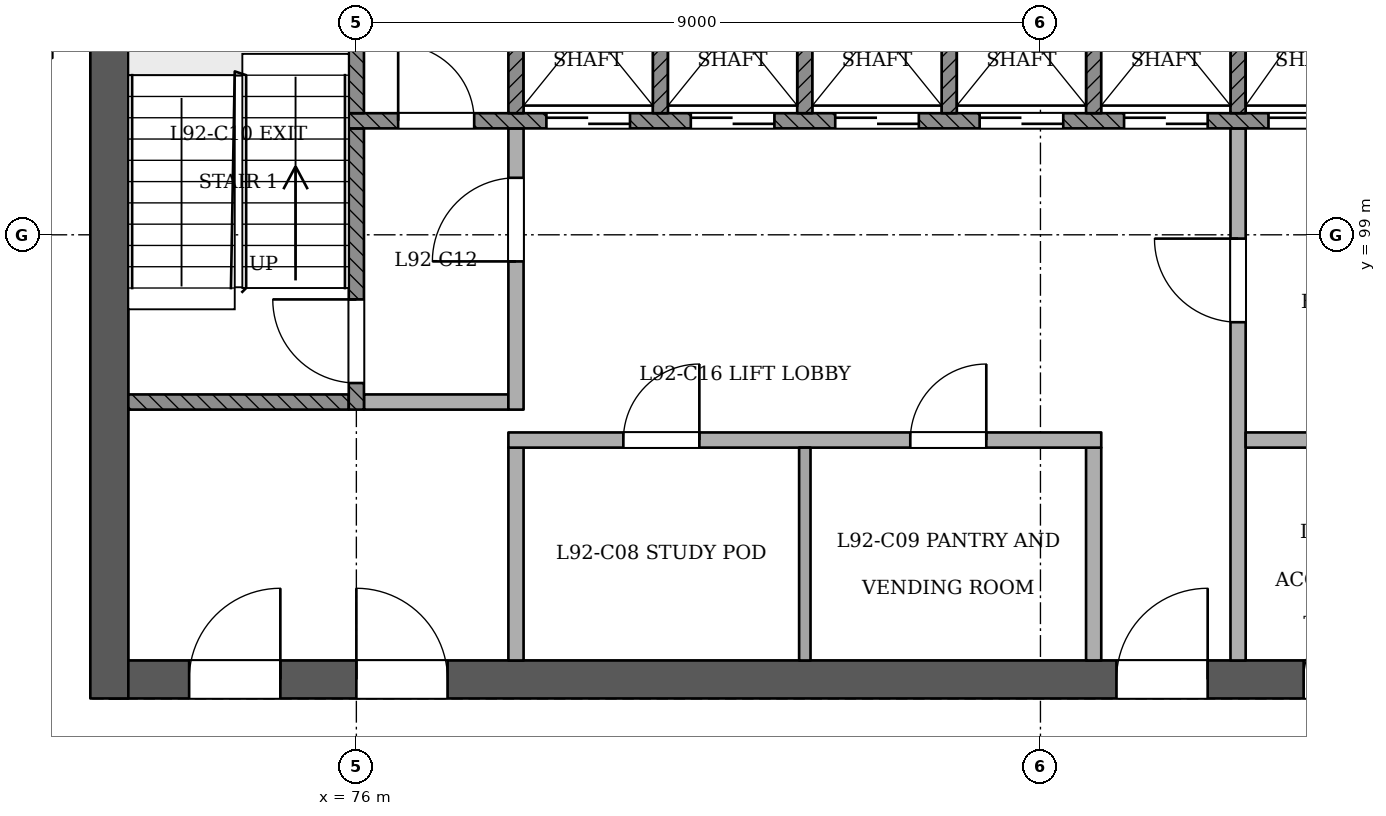
"""IFC4 building model, lengths in metres.
Left out: names, types, materials, properties, quantities, classifications, styles, units other than length and angle.
Written with IfcOpenShell. Run it as: python <this file> out.ifc"""

import sys

from ifc_helpers import new_model, si_unit, direction, frame, frame_2d, origin, place, context, subcontext, project, spatial, rectangle, extrude, element, fill, save


model = new_model("IFC4")
c1 = context("Model", 3, precision=1e-05, world=origin(), true_north=direction((0.0, 1.0)))
c2 = subcontext(c1, "Body", "Model", "MODEL_VIEW")
j1 = project(units=[si_unit("LENGTHUNIT", "METRE"), si_unit("PLANEANGLEUNIT", "RADIAN")], contexts=[c1])
p1 = place(None, origin())
s1 = spatial("IfcSite", under=j1, at=p1, CompositionType="ELEMENT")
p2 = place(p1, origin())
s2 = spatial("IfcBuilding", under=s1, at=p2, CompositionType="ELEMENT")
p3 = place(p2, frame((0.0, 0.0, 354.4)))
s3 = spatial("IfcBuildingStorey", under=s2, at=p3, CompositionType="ELEMENT", Elevation=354.4)
p4 = place(p3, frame((72.75, 93.15, 0.0), z_axis=(0.0, 0.0, 1.0), x_axis=(1.0, 0.0, 0.0)))
e1 = element("IfcWall", 1, at=p4, inside=s3, PredefinedType="SHEAR", context=c2, shape_type="SweptSolid", body=[
    extrude(rectangle(XDim=24.75, YDim=0.5, at=frame_2d((12.375, 0.0))), origin(), (0.0, 0.0, 1.0), 3.6),
])
p5 = place(p4, frame((1.05, 0.0, 0.0)))
e2 = element("IfcOpeningElement", 2, at=p5, cuts=e1, PredefinedType="OPENING", context=c2, shape_type="SweptSolid", body=[
    extrude(rectangle(XDim=1.2, YDim=2.1, at=frame_2d((0.6, 1.05))), frame((0.0, 0.26, 0.0), z_axis=(0.0, -1.0, 0.0), x_axis=(1.0, 0.0, 0.0)), (0.0, 0.0, 1.0), 0.521),
])
p6 = place(p4, frame((3.25, 0.0, 0.0)))
e3 = element("IfcOpeningElement", 3, at=p6, cuts=e1, PredefinedType="OPENING", context=c2, shape_type="SweptSolid", body=[
    extrude(rectangle(XDim=1.2, YDim=2.1, at=frame_2d((0.6, 1.05))), frame((0.0, 0.26, 0.0), z_axis=(0.0, -1.0, 0.0), x_axis=(1.0, 0.0, 0.0)), (0.0, 0.0, 1.0), 0.521),
])
p7 = place(p4, frame((13.25, 0.0, 0.0)))
e4 = element("IfcOpeningElement", 4, at=p7, cuts=e1, PredefinedType="OPENING", context=c2, shape_type="SweptSolid", body=[
    extrude(rectangle(XDim=1.2, YDim=2.1, at=frame_2d((0.6, 1.05))), frame((0.0, 0.26, 0.0), z_axis=(0.0, -1.0, 0.0), x_axis=(1.0, 0.0, 0.0)), (0.0, 0.0, 1.0), 0.521),
])
p8 = place(p4, frame((15.712, 0.0, 0.0)))
e5 = element("IfcOpeningElement", 5, at=p8, cuts=e1, PredefinedType="OPENING", context=c2, shape_type="SweptSolid", body=[
    extrude(rectangle(XDim=1.0, YDim=2.1, at=frame_2d((0.5, 1.05))), frame((0.0, 0.26, 0.0), z_axis=(0.0, -1.0, 0.0), x_axis=(1.0, 0.0, 0.0)), (0.0, 0.0, 1.0), 0.521),
])
p9 = place(p4, frame((18.15, 0.0, 0.0)))
e6 = element("IfcOpeningElement", 6, at=p9, cuts=e1, PredefinedType="OPENING", context=c2, shape_type="SweptSolid", body=[
    extrude(rectangle(XDim=1.0, YDim=2.1, at=frame_2d((0.5, 1.05))), frame((0.0, 0.26, 0.0), z_axis=(0.0, -1.0, 0.0), x_axis=(1.0, 0.0, 0.0)), (0.0, 0.0, 1.0), 0.521),
])
p10 = place(p4, frame((20.5, 0.0, 0.0)))
e7 = element("IfcOpeningElement", 7, at=p10, cuts=e1, PredefinedType="OPENING", context=c2, shape_type="SweptSolid", body=[
    extrude(rectangle(XDim=1.0, YDim=2.1, at=frame_2d((0.5, 1.05))), frame((0.0, 0.26, 0.0), z_axis=(0.0, -1.0, 0.0), x_axis=(1.0, 0.0, 0.0)), (0.0, 0.0, 1.0), 0.521),
])
p11 = place(p4, frame((22.788, 0.0, 0.0)))
e8 = element("IfcOpeningElement", 8, at=p11, cuts=e1, PredefinedType="OPENING", context=c2, shape_type="SweptSolid", body=[
    extrude(rectangle(XDim=1.0, YDim=2.1, at=frame_2d((0.5, 1.05))), frame((0.0, 0.26, 0.0), z_axis=(0.0, -1.0, 0.0), x_axis=(1.0, 0.0, 0.0)), (0.0, 0.0, 1.0), 0.521),
])
p12 = place(p3, frame((72.75, 103.65, 0.0), z_axis=(0.0, 0.0, 1.0), x_axis=(0.0, -1.0, 0.0)))
e9 = element("IfcWall", 9, at=p12, inside=s3, PredefinedType="SHEAR", context=c2, shape_type="SweptSolid", body=[
    extrude(rectangle(XDim=10.75, YDim=0.5, at=frame_2d((5.375, 0.0))), origin(), (0.0, 0.0, 1.0), 3.6),
])
p13 = place(p3, frame((78.1, 93.4, 0.0), z_axis=(0.0, 0.0, 1.0), x_axis=(0.0, 1.0, 0.0)))
e10 = element("IfcWall", 10, at=p13, inside=s3, PredefinedType="PARTITIONING", context=c2, shape_type="SweptSolid", body=[
    extrude(rectangle(XDim=2.8, YDim=0.2, at=frame_2d((1.4, 0.0))), origin(), (0.0, 0.0, 1.0), 3.3),
])
p14 = place(p3, frame((81.9, 93.4, 0.0), z_axis=(0.0, 0.0, 1.0), x_axis=(0.0, 1.0, 0.0)))
e11 = element("IfcWall", 11, at=p14, inside=s3, PredefinedType="PARTITIONING", context=c2, shape_type="SweptSolid", body=[
    extrude(rectangle(XDim=2.8, YDim=0.15, at=frame_2d((1.4, 0.0))), origin(), (0.0, 0.0, 1.0), 3.3),
])
p15 = place(p3, frame((85.7, 93.4, 0.0), z_axis=(0.0, 0.0, 1.0), x_axis=(0.0, 1.0, 0.0)))
e12 = element("IfcWall", 12, at=p15, inside=s3, PredefinedType="PARTITIONING", context=c2, shape_type="SweptSolid", body=[
    extrude(rectangle(XDim=2.8, YDim=0.2, at=frame_2d((1.4, 0.0))), origin(), (0.0, 0.0, 1.0), 3.3),
])
p16 = place(p3, frame((87.6, 93.4, 0.0), z_axis=(0.0, 0.0, 1.0), x_axis=(0.0, 1.0, 0.0)))
e13 = element("IfcWall", 13, at=p16, inside=s3, PredefinedType="PARTITIONING", context=c2, shape_type="SweptSolid", body=[
    extrude(rectangle(XDim=7.0, YDim=0.2, at=frame_2d((3.5, 0.0))), origin(), (0.0, 0.0, 1.0), 3.3),
])
p17 = place(p16, frame((4.45, 0.0, 0.0)))
e14 = element("IfcOpeningElement", 14, at=p17, cuts=e13, PredefinedType="OPENING", context=c2, shape_type="SweptSolid", body=[
    extrude(rectangle(XDim=1.1, YDim=2.1, at=frame_2d((0.55, 1.05))), frame((0.0, 0.11, 0.0), z_axis=(0.0, -1.0, 0.0), x_axis=(1.0, 0.0, 0.0)), (0.0, 0.0, 1.0), 0.221),
])
p18 = place(p3, frame((78.0, 96.3, 0.0), z_axis=(0.0, 0.0, 1.0), x_axis=(1.0, 0.0, 0.0)))
e15 = element("IfcWall", 15, at=p18, inside=s3, PredefinedType="PARTITIONING", context=c2, shape_type="SweptSolid", body=[
    extrude(rectangle(XDim=7.8, YDim=0.2, at=frame_2d((3.9, 0.0))), origin(), (0.0, 0.0, 1.0), 3.3),
])
p19 = place(p18, frame((1.512, 0.0, 0.0)))
e16 = element("IfcOpeningElement", 16, at=p19, cuts=e15, PredefinedType="OPENING", context=c2, shape_type="SweptSolid", body=[
    extrude(rectangle(XDim=1.0, YDim=2.1, at=frame_2d((0.5, 1.05))), frame((0.0, 0.11, 0.0), z_axis=(0.0, -1.0, 0.0), x_axis=(1.0, 0.0, 0.0)), (0.0, 0.0, 1.0), 0.221),
])
p20 = place(p18, frame((5.288, 0.0, 0.0)))
e17 = element("IfcOpeningElement", 17, at=p20, cuts=e15, PredefinedType="OPENING", context=c2, shape_type="SweptSolid", body=[
    extrude(rectangle(XDim=1.0, YDim=2.1, at=frame_2d((0.5, 1.05))), frame((0.0, 0.11, 0.0), z_axis=(0.0, -1.0, 0.0), x_axis=(1.0, 0.0, 0.0)), (0.0, 0.0, 1.0), 0.221),
])
p21 = place(p3, frame((87.7, 96.3, 0.0), z_axis=(0.0, 0.0, 1.0), x_axis=(1.0, 0.0, 0.0)))
e18 = element("IfcWall", 18, at=p21, inside=s3, PredefinedType="PARTITIONING", context=c2, shape_type="SweptSolid", body=[
    extrude(rectangle(XDim=3.6, YDim=0.2, at=frame_2d((1.8, 0.0))), origin(), (0.0, 0.0, 1.0), 3.3),
])
p22 = place(p3, frame((73.0, 96.8, 0.0), z_axis=(0.0, 0.0, 1.0), x_axis=(1.0, 0.0, 0.0)))
e19 = element("IfcWall", 19, at=p22, inside=s3, PredefinedType="SOLIDWALL", context=c2, shape_type="SweptSolid", body=[
    extrude(rectangle(XDim=2.9, YDim=0.2, at=frame_2d((1.45, 0.0))), origin(), (0.0, 0.0, 1.0), 3.3),
])
p23 = place(p3, frame((76.0, 96.7, 0.0), z_axis=(0.0, 0.0, 1.0), x_axis=(0.0, 1.0, 0.0)))
e20 = element("IfcWall", 20, at=p23, inside=s3, PredefinedType="SOLIDWALL", context=c2, shape_type="SweptSolid", body=[
    extrude(rectangle(XDim=3.7, YDim=0.2, at=frame_2d((1.85, 0.0))), origin(), (0.0, 0.0, 1.0), 3.3),
])
p24 = place(p23, frame((0.35, 0.0, 0.0)))
e21 = element("IfcOpeningElement", 21, at=p24, cuts=e20, PredefinedType="OPENING", context=c2, shape_type="SweptSolid", body=[
    extrude(rectangle(XDim=1.1, YDim=2.1, at=frame_2d((0.55, 1.05))), frame((0.0, 0.11, 0.0), z_axis=(0.0, -1.0, 0.0), x_axis=(1.0, 0.0, 0.0)), (0.0, 0.0, 1.0), 0.221),
])
p25 = place(p3, frame((76.1, 96.8, 0.0), z_axis=(0.0, 0.0, 1.0), x_axis=(1.0, 0.0, 0.0)))
e22 = element("IfcWall", 22, at=p25, inside=s3, PredefinedType="PARTITIONING", context=c2, shape_type="SweptSolid", body=[
    extrude(rectangle(XDim=1.9, YDim=0.2, at=frame_2d((0.95, 0.0))), origin(), (0.0, 0.0, 1.0), 3.3),
])
p26 = place(p3, frame((78.1, 96.7, 0.0), z_axis=(0.0, 0.0, 1.0), x_axis=(0.0, 1.0, 0.0)))
e23 = element("IfcWall", 23, at=p26, inside=s3, PredefinedType="PARTITIONING", context=c2, shape_type="SweptSolid", body=[
    extrude(rectangle(XDim=3.7, YDim=0.2, at=frame_2d((1.85, 0.0))), origin(), (0.0, 0.0, 1.0), 3.3),
])
p27 = place(p26, frame((1.95, 0.0, 0.0)))
e24 = element("IfcOpeningElement", 24, at=p27, cuts=e23, PredefinedType="OPENING", context=c2, shape_type="SweptSolid", body=[
    extrude(rectangle(XDim=1.1, YDim=2.1, at=frame_2d((0.55, 1.05))), frame((0.0, 0.11, 0.0), z_axis=(0.0, -1.0, 0.0), x_axis=(1.0, 0.0, 0.0)), (0.0, 0.0, 1.0), 0.221),
])
p28 = place(p3, frame((75.9, 100.5, 0.0), z_axis=(0.0, 0.0, 1.0), x_axis=(1.0, 0.0, 0.0)))
e25 = element("IfcWall", 25, at=p28, inside=s3, PredefinedType="SOLIDWALL", context=c2, shape_type="SweptSolid", body=[
    extrude(rectangle(XDim=18.2, YDim=0.2, at=frame_2d((9.1, 0.0))), origin(), (0.0, 0.0, 1.0), 3.3),
])
p29 = place(p28, frame((2.6, 0.0, 0.0)))
e26 = element("IfcOpeningElement", 26, at=p29, cuts=e25, PredefinedType="OPENING", context=c2, shape_type="SweptSolid", body=[
    extrude(rectangle(XDim=1.1, YDim=2.1, at=frame_2d((0.55, 1.05))), frame((0.0, 0.11, 0.0), z_axis=(0.0, -1.0, 0.0), x_axis=(1.0, 0.0, 0.0)), (0.0, 0.0, 1.0), 0.221),
])
p30 = place(p28, frame((4.5, 0.0, 0.0)))
e27 = element("IfcOpeningElement", 27, at=p30, cuts=e25, PredefinedType="OPENING", context=c2, shape_type="SweptSolid", body=[
    extrude(rectangle(XDim=1.1, YDim=2.1, at=frame_2d((0.55, 1.05))), frame((0.0, 0.11, 0.0), z_axis=(0.0, -1.0, 0.0), x_axis=(1.0, 0.0, 0.0)), (0.0, 0.0, 1.0), 0.221),
])
p31 = place(p28, frame((6.4, 0.0, 0.0)))
e28 = element("IfcOpeningElement", 28, at=p31, cuts=e25, PredefinedType="OPENING", context=c2, shape_type="SweptSolid", body=[
    extrude(rectangle(XDim=1.1, YDim=2.1, at=frame_2d((0.55, 1.05))), frame((0.0, 0.11, 0.0), z_axis=(0.0, -1.0, 0.0), x_axis=(1.0, 0.0, 0.0)), (0.0, 0.0, 1.0), 0.221),
])
p32 = place(p28, frame((8.3, 0.0, 0.0)))
e29 = element("IfcOpeningElement", 29, at=p32, cuts=e25, PredefinedType="OPENING", context=c2, shape_type="SweptSolid", body=[
    extrude(rectangle(XDim=1.1, YDim=2.1, at=frame_2d((0.55, 1.05))), frame((0.0, 0.11, 0.0), z_axis=(0.0, -1.0, 0.0), x_axis=(1.0, 0.0, 0.0)), (0.0, 0.0, 1.0), 0.221),
])
p33 = place(p28, frame((10.2, 0.0, 0.0)))
e30 = element("IfcOpeningElement", 30, at=p33, cuts=e25, PredefinedType="OPENING", context=c2, shape_type="SweptSolid", body=[
    extrude(rectangle(XDim=1.1, YDim=2.1, at=frame_2d((0.55, 1.05))), frame((0.0, 0.11, 0.0), z_axis=(0.0, -1.0, 0.0), x_axis=(1.0, 0.0, 0.0)), (0.0, 0.0, 1.0), 0.221),
])
p34 = place(p28, frame((12.1, 0.0, 0.0)))
e31 = element("IfcOpeningElement", 31, at=p34, cuts=e25, PredefinedType="OPENING", context=c2, shape_type="SweptSolid", body=[
    extrude(rectangle(XDim=1.1, YDim=2.1, at=frame_2d((0.55, 1.05))), frame((0.0, 0.11, 0.0), z_axis=(0.0, -1.0, 0.0), x_axis=(1.0, 0.0, 0.0)), (0.0, 0.0, 1.0), 0.221),
])
p35 = place(p28, frame((14.0, 0.0, 0.0)))
e32 = element("IfcOpeningElement", 32, at=p35, cuts=e25, PredefinedType="OPENING", context=c2, shape_type="SweptSolid", body=[
    extrude(rectangle(XDim=1.1, YDim=2.1, at=frame_2d((0.55, 1.05))), frame((0.0, 0.11, 0.0), z_axis=(0.0, -1.0, 0.0), x_axis=(1.0, 0.0, 0.0)), (0.0, 0.0, 1.0), 0.221),
])
p36 = place(p28, frame((0.65, 0.0, 0.0)))
e33 = element("IfcOpeningElement", 33, at=p36, cuts=e25, PredefinedType="OPENING", context=c2, shape_type="SweptSolid", body=[
    extrude(rectangle(XDim=1.0, YDim=2.1, at=frame_2d((0.5, 1.05))), frame((0.0, 0.11, 0.0), z_axis=(0.0, -1.0, 0.0), x_axis=(1.0, 0.0, 0.0)), (0.0, 0.0, 1.0), 0.221),
])
p37 = place(p28, frame((16.3, 0.0, 0.0)))
e34 = element("IfcOpeningElement", 34, at=p37, cuts=e25, PredefinedType="OPENING", context=c2, shape_type="SweptSolid", body=[
    extrude(rectangle(XDim=1.0, YDim=2.1, at=frame_2d((0.5, 1.05))), frame((0.0, 0.11, 0.0), z_axis=(0.0, -1.0, 0.0), x_axis=(1.0, 0.0, 0.0)), (0.0, 0.0, 1.0), 0.221),
])
for number, where, z_axis, x_axis in (
    (35, (76.0, 100.6, 0.0), (0.0, 0.0, 1.0), (0.0, 1.0, 0.0)),
    (36, (78.1, 100.6, 0.0), (0.0, 0.0, 1.0), (0.0, 1.0, 0.0)),
    (37, (80.0, 100.6, 0.0), (0.0, 0.0, 1.0), (0.0, 1.0, 0.0)),
    (38, (81.9, 100.6, 0.0), (0.0, 0.0, 1.0), (0.0, 1.0, 0.0)),
    (39, (83.8, 100.6, 0.0), (0.0, 0.0, 1.0), (0.0, 1.0, 0.0)),
    (40, (85.7, 100.6, 0.0), (0.0, 0.0, 1.0), (0.0, 1.0, 0.0)),
    (41, (87.6, 100.6, 0.0), (0.0, 0.0, 1.0), (0.0, 1.0, 0.0)),
):
    element("IfcWall", number, at=place(p3, frame(where, z_axis=z_axis, x_axis=x_axis)), inside=s3, PredefinedType="SOLIDWALL", context=c2, shape_type="SweptSolid", body=[
        extrude(rectangle(XDim=2.8, YDim=0.2, at=frame_2d((1.4, 0.0))), origin(), (0.0, 0.0, 1.0), 3.3),
    ])
p38 = place(p29, origin())
e42 = element("IfcDoor", 42, at=p38, inside=s3, OperationType="SLIDING_TO_RIGHT", PredefinedType="NOTDEFINED", context=c2, shape_type="SweptSolid", body=[
    extrude(rectangle(XDim=1.1, YDim=2.1, at=frame_2d((0.55, 1.05))), frame((0.0, 0.025, 0.0), z_axis=(0.0, -1.0, 0.0), x_axis=(1.0, 0.0, 0.0)), (0.0, 0.0, 1.0), 0.05),
])
fill(e26, e42)
p39 = place(p30, origin())
e43 = element("IfcDoor", 43, at=p39, inside=s3, OperationType="SLIDING_TO_LEFT", PredefinedType="NOTDEFINED", context=c2, shape_type="SweptSolid", body=[
    extrude(rectangle(XDim=1.1, YDim=2.1, at=frame_2d((0.55, 1.05))), frame((0.0, 0.025, 0.0), z_axis=(0.0, -1.0, 0.0), x_axis=(1.0, 0.0, 0.0)), (0.0, 0.0, 1.0), 0.05),
])
fill(e27, e43)
p40 = place(p31, origin())
e44 = element("IfcDoor", 44, at=p40, inside=s3, OperationType="SLIDING_TO_RIGHT", PredefinedType="NOTDEFINED", context=c2, shape_type="SweptSolid", body=[
    extrude(rectangle(XDim=1.1, YDim=2.1, at=frame_2d((0.55, 1.05))), frame((0.0, 0.025, 0.0), z_axis=(0.0, -1.0, 0.0), x_axis=(1.0, 0.0, 0.0)), (0.0, 0.0, 1.0), 0.05),
])
fill(e28, e44)
p41 = place(p32, origin())
e45 = element("IfcDoor", 45, at=p41, inside=s3, OperationType="SLIDING_TO_LEFT", PredefinedType="NOTDEFINED", context=c2, shape_type="SweptSolid", body=[
    extrude(rectangle(XDim=1.1, YDim=2.1, at=frame_2d((0.55, 1.05))), frame((0.0, 0.025, 0.0), z_axis=(0.0, -1.0, 0.0), x_axis=(1.0, 0.0, 0.0)), (0.0, 0.0, 1.0), 0.05),
])
fill(e29, e45)
p42 = place(p33, origin())
e46 = element("IfcDoor", 46, at=p42, inside=s3, OperationType="SLIDING_TO_RIGHT", PredefinedType="NOTDEFINED", context=c2, shape_type="SweptSolid", body=[
    extrude(rectangle(XDim=1.1, YDim=2.1, at=frame_2d((0.55, 1.05))), frame((0.0, 0.025, 0.0), z_axis=(0.0, -1.0, 0.0), x_axis=(1.0, 0.0, 0.0)), (0.0, 0.0, 1.0), 0.05),
])
fill(e30, e46)
p43 = place(p34, origin())
e47 = element("IfcDoor", 47, at=p43, inside=s3, OperationType="SLIDING_TO_RIGHT", PredefinedType="NOTDEFINED", context=c2, shape_type="SweptSolid", body=[
    extrude(rectangle(XDim=1.1, YDim=2.1, at=frame_2d((0.55, 1.05))), frame((0.0, 0.025, 0.0), z_axis=(0.0, -1.0, 0.0), x_axis=(1.0, 0.0, 0.0)), (0.0, 0.0, 1.0), 0.05),
])
fill(e31, e47)
p44 = place(p24, origin())
e48 = element("IfcDoor", 48, at=p44, inside=s3, OperationType="SINGLE_SWING_RIGHT", PredefinedType="NOTDEFINED", context=c2, shape_type="SweptSolid", body=[
    extrude(rectangle(XDim=1.1, YDim=2.1, at=frame_2d((0.55, 1.05))), frame((0.0, 0.025, 0.0), z_axis=(0.0, -1.0, 0.0), x_axis=(1.0, 0.0, 0.0)), (0.0, 0.0, 1.0), 0.05),
])
fill(e21, e48)
p45 = place(p27, origin())
e49 = element("IfcDoor", 49, at=p45, inside=s3, OperationType="SINGLE_SWING_LEFT", PredefinedType="NOTDEFINED", context=c2, shape_type="SweptSolid", body=[
    extrude(rectangle(XDim=1.1, YDim=2.1, at=frame_2d((0.55, 1.05))), frame((0.0, 0.025, 0.0), z_axis=(0.0, -1.0, 0.0), x_axis=(1.0, 0.0, 0.0)), (0.0, 0.0, 1.0), 0.05),
])
fill(e24, e49)
p46 = place(p17, origin())
e50 = element("IfcDoor", 50, at=p46, inside=s3, OperationType="SINGLE_SWING_RIGHT", PredefinedType="NOTDEFINED", context=c2, shape_type="SweptSolid", body=[
    extrude(rectangle(XDim=1.1, YDim=2.1, at=frame_2d((0.55, 1.05))), frame((0.0, 0.025, 0.0), z_axis=(0.0, -1.0, 0.0), x_axis=(1.0, 0.0, 0.0)), (0.0, 0.0, 1.0), 0.05),
])
fill(e14, e50)
p47 = place(p5, origin())
e51 = element("IfcDoor", 51, at=p47, inside=s3, OperationType="SINGLE_SWING_RIGHT", PredefinedType="NOTDEFINED", context=c2, shape_type="SweptSolid", body=[
    extrude(rectangle(XDim=1.2, YDim=2.1, at=frame_2d((0.6, 1.05))), frame((0.0, 0.025, 0.0), z_axis=(0.0, -1.0, 0.0), x_axis=(1.0, 0.0, 0.0)), (0.0, 0.0, 1.0), 0.05),
])
fill(e2, e51)
p48 = place(p6, origin())
e52 = element("IfcDoor", 52, at=p48, inside=s3, OperationType="SINGLE_SWING_LEFT", PredefinedType="NOTDEFINED", context=c2, shape_type="SweptSolid", body=[
    extrude(rectangle(XDim=1.2, YDim=2.1, at=frame_2d((0.6, 1.05))), frame((0.0, 0.025, 0.0), z_axis=(0.0, -1.0, 0.0), x_axis=(1.0, 0.0, 0.0)), (0.0, 0.0, 1.0), 0.05),
])
fill(e3, e52)
p49 = place(p7, origin())
e53 = element("IfcDoor", 53, at=p49, inside=s3, OperationType="SINGLE_SWING_RIGHT", PredefinedType="NOTDEFINED", context=c2, shape_type="SweptSolid", body=[
    extrude(rectangle(XDim=1.2, YDim=2.1, at=frame_2d((0.6, 1.05))), frame((0.0, 0.025, 0.0), z_axis=(0.0, -1.0, 0.0), x_axis=(1.0, 0.0, 0.0)), (0.0, 0.0, 1.0), 0.05),
])
fill(e4, e53)
p50 = place(p36, origin())
e54 = element("IfcDoor", 54, at=p50, inside=s3, OperationType="SINGLE_SWING_LEFT", PredefinedType="NOTDEFINED", context=c2, shape_type="SweptSolid", body=[
    extrude(rectangle(XDim=1.0, YDim=2.1, at=frame_2d((0.5, 1.05))), frame((0.0, 0.025, 0.0), z_axis=(0.0, -1.0, 0.0), x_axis=(1.0, 0.0, 0.0)), (0.0, 0.0, 1.0), 0.05),
])
fill(e33, e54)
p51 = place(p8, origin())
e55 = element("IfcDoor", 55, at=p51, inside=s3, OperationType="SINGLE_SWING_RIGHT", PredefinedType="NOTDEFINED", context=c2, shape_type="SweptSolid", body=[
    extrude(rectangle(XDim=1.0, YDim=2.1, at=frame_2d((0.5, 1.05))), frame((0.0, 0.025, 0.0), z_axis=(0.0, -1.0, 0.0), x_axis=(1.0, 0.0, 0.0)), (0.0, 0.0, 1.0), 0.05),
])
fill(e5, e55)
p52 = place(p19, origin())
e56 = element("IfcDoor", 56, at=p52, inside=s3, OperationType="SINGLE_SWING_RIGHT", PredefinedType="NOTDEFINED", context=c2, shape_type="SweptSolid", body=[
    extrude(rectangle(XDim=1.0, YDim=2.1, at=frame_2d((0.5, 1.05))), frame((0.0, 0.025, 0.0), z_axis=(0.0, -1.0, 0.0), x_axis=(1.0, 0.0, 0.0)), (0.0, 0.0, 1.0), 0.05),
])
fill(e16, e56)
p53 = place(p20, origin())
e57 = element("IfcDoor", 57, at=p53, inside=s3, OperationType="SINGLE_SWING_RIGHT", PredefinedType="NOTDEFINED", context=c2, shape_type="SweptSolid", body=[
    extrude(rectangle(XDim=1.0, YDim=2.1, at=frame_2d((0.5, 1.05))), frame((0.0, 0.025, 0.0), z_axis=(0.0, -1.0, 0.0), x_axis=(1.0, 0.0, 0.0)), (0.0, 0.0, 1.0), 0.05),
])
fill(e17, e57)
save(model, sys.argv[1])
